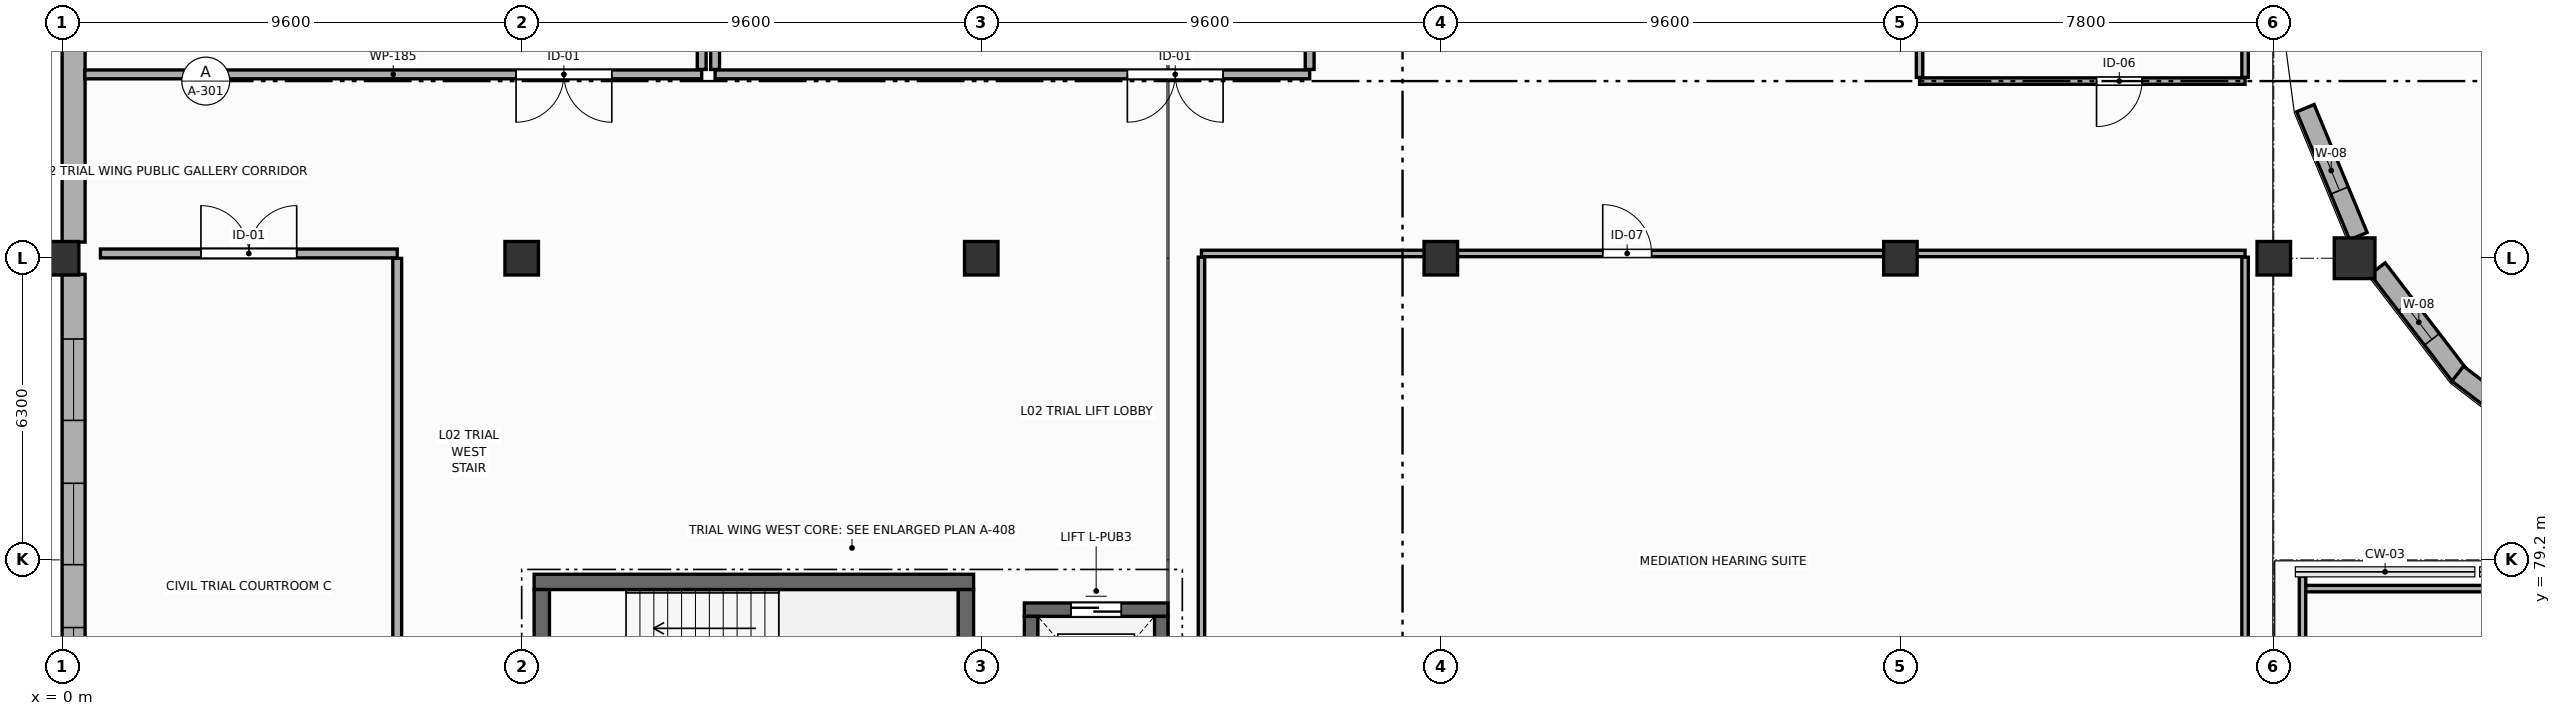
"""IFC4 building model, lengths in metres.
Left out: names, types, materials, properties, quantities, classifications, styles, units other than length and angle.
Written with IfcOpenShell. Run it as: python <this file> out.ifc"""

import sys

from ifc_helpers import new_model, si_unit, direction, frame, frame_2d, origin, origin_2d, place, context, subcontext, project, spatial, rectangle, circle, extrude, element, fill, save


model = new_model("IFC4")
c1 = context("Model", 3, precision=1e-05, world=origin(), true_north=direction((0.0, 1.0)))
c2 = subcontext(c1, "Body", "Model", "MODEL_VIEW")
j1 = project(units=[si_unit("LENGTHUNIT", "METRE"), si_unit("PLANEANGLEUNIT", "RADIAN")], contexts=[c1])
p1 = place(None, origin())
s1 = spatial("IfcSite", under=j1, at=p1, CompositionType="ELEMENT")
p2 = place(p1, origin())
s2 = spatial("IfcBuilding", under=s1, at=p2, CompositionType="ELEMENT")
p3 = place(p2, frame((0.0, 0.0, 5.4)))
s3 = spatial("IfcBuildingStorey", under=s2, at=p3, CompositionType="ELEMENT", Elevation=5.4)
p4 = place(p3, frame((47.888, 85.5, 0.0), z_axis=(0.0, 0.0, 1.0), x_axis=(1.0, 0.0, 0.0)))
e1 = element("IfcColumn", 1, at=p4, inside=s3, PredefinedType="COLUMN", context=c2, shape_type="SweptSolid", body=[
    extrude(circle(Radius=0.425, at=origin_2d()), origin(), (0.0, 0.0, 1.0), 4.5),
])
for number, where, z_axis, x_axis in (
    (2, (0.0, 85.5, 0.0), (0.0, 0.0, 1.0), (1.0, 0.0, 0.0)),
    (3, (9.6, 85.5, 0.0), (0.0, 0.0, 1.0), (1.0, 0.0, 0.0)),
    (4, (19.2, 85.5, 0.0), (0.0, 0.0, 1.0), (1.0, 0.0, 0.0)),
    (5, (28.8, 85.5, 0.0), (0.0, 0.0, 1.0), (1.0, 0.0, 0.0)),
    (6, (38.4, 85.5, 0.0), (0.0, 0.0, 1.0), (1.0, 0.0, 0.0)),
    (7, (46.2, 85.5, 0.0), (0.0, 0.0, 1.0), (1.0, 0.0, 0.0)),
):
    element("IfcColumn", number, at=place(p3, frame(where, z_axis=z_axis, x_axis=x_axis)), inside=s3, PredefinedType="COLUMN", context=c2, shape_type="SweptSolid", body=[
        extrude(rectangle(XDim=0.7, YDim=0.7, at=origin_2d()), origin(), (0.0, 0.0, 1.0), 4.5),
    ])
p5 = place(p3, frame((46.86, 88.635, 0.0), z_axis=(0.0, 0.0, 1.0), x_axis=(0.382642547526, -0.923896466506, 0.0)))
e8 = element("IfcWall", 8, at=p5, inside=s3, PredefinedType="ELEMENTEDWALL", context=c2, shape_type="SweptSolid", body=[
    extrude(rectangle(XDim=2.892, YDim=0.395, at=frame_2d((1.446, 0.0))), origin(), (0.0, 0.0, 1.0), 3.37),
])
p6 = place(p5, frame((0.962, 0.0, 0.85)))
e9 = element("IfcOpeningElement", 9, at=p6, cuts=e8, PredefinedType="OPENING", context=c2, shape_type="SweptSolid", body=[
    extrude(rectangle(XDim=0.9, YDim=1.85, at=frame_2d((0.45, 0.925))), frame((0.0, 0.208, 0.0), z_axis=(0.0, -1.0, 0.0), x_axis=(1.0, 0.0, 0.0)), (0.0, 0.0, 1.0), 0.415),
])
p7 = place(p3, frame((48.369, 85.283, 0.0), z_axis=(0.0, 0.0, 1.0), x_axis=(0.608787157184, -0.793333597705, 0.0)))
e10 = element("IfcWall", 10, at=p7, inside=s3, PredefinedType="ELEMENTEDWALL", context=c2, shape_type="SweptSolid", body=[
    extrude(rectangle(XDim=2.824, YDim=0.395, at=frame_2d((1.412, 0.0))), origin(), (0.0, 0.0, 1.0), 3.37),
])
p8 = place(p7, frame((0.962, 0.0, 0.85)))
e11 = element("IfcOpeningElement", 11, at=p8, cuts=e10, PredefinedType="OPENING", context=c2, shape_type="SweptSolid", body=[
    extrude(rectangle(XDim=0.9, YDim=1.85, at=frame_2d((0.45, 0.925))), frame((0.0, 0.208, 0.0), z_axis=(0.0, -1.0, 0.0), x_axis=(1.0, 0.0, 0.0)), (0.0, 0.0, 1.0), 0.415),
])
p9 = place(p3, frame((50.043, 83.089, 0.0), z_axis=(0.0, 0.0, 1.0), x_axis=(0.793301558375, -0.608828906574, 0.0)))
e12 = element("IfcWall", 12, at=p9, inside=s3, PredefinedType="ELEMENTEDWALL", context=c2, shape_type="SweptSolid", body=[
    extrude(rectangle(XDim=2.824, YDim=0.395, at=frame_2d((1.412, 0.0))), origin(), (0.0, 0.0, 1.0), 3.27),
])
p10 = place(p9, frame((0.962, 0.0, 0.85)))
e13 = element("IfcOpeningElement", 13, at=p10, cuts=e12, PredefinedType="OPENING", context=c2, shape_type="SweptSolid", body=[
    extrude(rectangle(XDim=0.9, YDim=1.85, at=frame_2d((0.45, 0.925))), frame((0.0, 0.208, 0.0), z_axis=(0.0, -1.0, 0.0), x_axis=(1.0, 0.0, 0.0)), (0.0, 0.0, 1.0), 0.415),
])
p11 = place(p3, frame((0.24, 74.742, 0.0), z_axis=(0.0, 0.0, 1.0), x_axis=(0.0, 1.0, 0.0)))
e14 = element("IfcWall", 14, at=p11, inside=s3, PredefinedType="STANDARD", context=c2, shape_type="SweptSolid", body=[
    extrude(rectangle(XDim=10.421, YDim=0.48, at=frame_2d((5.21, 0.0))), origin(), (0.0, 0.0, 1.0), 3.33),
])
p12 = place(p11, frame((1.345, 0.0, 0.85)))
e15 = element("IfcOpeningElement", 15, at=p12, cuts=e14, PredefinedType="OPENING", context=c2, shape_type="SweptSolid", body=[
    extrude(rectangle(XDim=1.7, YDim=2.3, at=frame_2d((0.85, 1.15))), frame((0.0, 0.25, 0.0), z_axis=(0.0, -1.0, 0.0), x_axis=(1.0, 0.0, 0.0)), (0.0, 0.0, 1.0), 0.5),
])
p13 = place(p11, frame((4.358, 0.0, 0.85)))
e16 = element("IfcOpeningElement", 16, at=p13, cuts=e14, PredefinedType="OPENING", context=c2, shape_type="SweptSolid", body=[
    extrude(rectangle(XDim=1.7, YDim=2.3, at=frame_2d((0.85, 1.15))), frame((0.0, 0.25, 0.0), z_axis=(0.0, -1.0, 0.0), x_axis=(1.0, 0.0, 0.0)), (0.0, 0.0, 1.0), 0.5),
])
p14 = place(p11, frame((7.371, 0.0, 0.85)))
e17 = element("IfcOpeningElement", 17, at=p14, cuts=e14, PredefinedType="OPENING", context=c2, shape_type="SweptSolid", body=[
    extrude(rectangle(XDim=1.7, YDim=2.3, at=frame_2d((0.85, 1.15))), frame((0.0, 0.25, 0.0), z_axis=(0.0, -1.0, 0.0), x_axis=(1.0, 0.0, 0.0)), (0.0, 0.0, 1.0), 0.5),
])
p15 = place(p3, frame((0.24, 85.837, 0.0), z_axis=(0.0, 0.0, 1.0), x_axis=(0.0, 1.0, 0.0)))
e18 = element("IfcWall", 18, at=p15, inside=s3, PredefinedType="STANDARD", context=c2, shape_type="SweptSolid", body=[
    extrude(rectangle(XDim=11.921, YDim=0.48, at=frame_2d((5.96, 0.0))), origin(), (0.0, 0.0, 1.0), 3.28),
])
p16 = place(p15, frame((5.113, 0.0, 0.76)))
e19 = element("IfcOpeningElement", 19, at=p16, cuts=e18, PredefinedType="OPENING", context=c2, shape_type="SweptSolid", body=[
    extrude(rectangle(XDim=1.7, YDim=2.3, at=frame_2d((0.85, 1.15))), frame((0.0, 0.25, 0.0), z_axis=(0.0, -1.0, 0.0), x_axis=(1.0, 0.0, 0.0)), (0.0, 0.0, 1.0), 0.5),
])
p17 = place(p15, frame((8.626, 0.0, 0.76)))
e20 = element("IfcOpeningElement", 20, at=p17, cuts=e18, PredefinedType="OPENING", context=c2, shape_type="SweptSolid", body=[
    extrude(rectangle(XDim=1.7, YDim=2.3, at=frame_2d((0.85, 1.15))), frame((0.0, 0.25, 0.0), z_axis=(0.0, -1.0, 0.0), x_axis=(1.0, 0.0, 0.0)), (0.0, 0.0, 1.0), 0.5),
])
p18 = place(p3, frame((9.86, 78.74, 0.0), z_axis=(0.0, 0.0, 1.0), x_axis=(1.0, 0.0, 0.0)))
e21 = element("IfcWall", 21, at=p18, inside=s3, PredefinedType="SHEAR", context=c2, shape_type="SweptSolid", body=[
    extrude(rectangle(XDim=9.18, YDim=0.32, at=frame_2d((4.59, 0.0))), origin(), (0.0, 0.0, 1.0), 4.24),
])
p19 = place(p3, frame((10.02, 75.18, 0.0), z_axis=(0.0, 0.0, 1.0), x_axis=(0.0, 1.0, 0.0)))
e22 = element("IfcWall", 22, at=p19, inside=s3, PredefinedType="SHEAR", context=c2, shape_type="SweptSolid", body=[
    extrude(rectangle(XDim=3.4, YDim=0.32, at=frame_2d((1.7, 0.0))), origin(), (0.0, 0.0, 1.0), 4.24),
])
p20 = place(p19, frame((1.125, 0.0, 0.0)))
e23 = element("IfcOpeningElement", 23, at=p20, cuts=e22, PredefinedType="OPENING", context=c2, shape_type="SweptSolid", body=[
    extrude(rectangle(XDim=1.15, YDim=2.2, at=frame_2d((0.575, 1.1))), frame((0.0, 0.17, 0.0), z_axis=(0.0, -1.0, 0.0), x_axis=(1.0, 0.0, 0.0)), (0.0, 0.0, 1.0), 0.34),
])
p21 = place(p3, frame((18.88, 78.58, 0.0), z_axis=(0.0, 0.0, 1.0), x_axis=(0.0, -1.0, 0.0)))
e24 = element("IfcWall", 24, at=p21, inside=s3, PredefinedType="SHEAR", context=c2, shape_type="SweptSolid", body=[
    extrude(rectangle(XDim=3.4, YDim=0.32, at=frame_2d((1.7, 0.0))), origin(), (0.0, 0.0, 1.0), 4.24),
])
p22 = place(p3, frame((20.1, 78.16, 0.0), z_axis=(0.0, 0.0, 1.0), x_axis=(1.0, 0.0, 0.0)))
e25 = element("IfcWall", 25, at=p22, inside=s3, PredefinedType="SHEAR", context=c2, shape_type="SweptSolid", body=[
    extrude(rectangle(XDim=3.0, YDim=0.28, at=frame_2d((1.5, 0.0))), origin(), (0.0, 0.0, 1.0), 4.24),
])
p23 = place(p22, frame((0.975, 0.0, 0.0)))
e26 = element("IfcOpeningElement", 26, at=p23, cuts=e25, PredefinedType="OPENING", context=c2, shape_type="SweptSolid", body=[
    extrude(rectangle(XDim=1.05, YDim=2.2, at=frame_2d((0.525, 1.1))), frame((0.0, 0.15, 0.0), z_axis=(0.0, -1.0, 0.0), x_axis=(1.0, 0.0, 0.0)), (0.0, 0.0, 1.0), 0.3),
])
for number, where, z_axis, x_axis in (
    (27, (20.24, 75.18, 0.0), (0.0, 0.0, 1.0), (0.0, 1.0, 0.0)),
    (28, (22.96, 78.02, 0.0), (0.0, 0.0, 1.0), (0.0, -1.0, 0.0)),
):
    element("IfcWall", number, at=place(p3, frame(where, z_axis=z_axis, x_axis=x_axis)), inside=s3, PredefinedType="SHEAR", context=c2, shape_type="SweptSolid", body=[
        extrude(rectangle(XDim=2.84, YDim=0.28, at=frame_2d((1.42, 0.0))), origin(), (0.0, 0.0, 1.0), 4.24),
    ])
p24 = place(p3, frame((13.36, 89.34, 0.0), z_axis=(0.0, 0.0, 1.0), x_axis=(-1.0, 0.0, 0.0)))
e29 = element("IfcWall", 29, at=p24, inside=s3, PredefinedType="PARTITIONING", context=c2, shape_type="SweptSolid", body=[
    extrude(rectangle(XDim=12.886, YDim=0.185, at=frame_2d((6.443, 0.0))), origin(), (0.0, 0.0, 1.0), 3.33),
])
p25 = place(p24, frame((1.878, 0.0, 0.0)))
e30 = element("IfcOpeningElement", 30, at=p25, cuts=e29, PredefinedType="OPENING", context=c2, shape_type="SweptSolid", body=[
    extrude(rectangle(XDim=2.0, YDim=2.5, at=frame_2d((1.0, 1.25))), frame((0.0, 0.103, 0.0), z_axis=(0.0, -1.0, 0.0), x_axis=(1.0, 0.0, 0.0)), (0.0, 0.0, 1.0), 0.205),
])
p26 = place(p3, frame((13.36, 112.326, 0.0), z_axis=(0.0, 0.0, 1.0), x_axis=(0.0, -1.0, 0.0)))
e31 = element("IfcWall", 31, at=p26, inside=s3, PredefinedType="PARTITIONING", context=c2, shape_type="SweptSolid", body=[
    extrude(rectangle(XDim=22.884, YDim=0.185, at=frame_2d((11.442, 0.0))), origin(), (0.0, 0.0, 1.0), 3.43),
])
p27 = place(p3, frame((26.06, 89.34, 0.0), z_axis=(0.0, 0.0, 1.0), x_axis=(-1.0, 0.0, 0.0)))
e32 = element("IfcWall", 32, at=p27, inside=s3, PredefinedType="PARTITIONING", context=c2, shape_type="SweptSolid", body=[
    extrude(rectangle(XDim=12.42, YDim=0.185, at=frame_2d((6.21, 0.0))), origin(), (0.0, 0.0, 1.0), 3.33),
])
p28 = place(p27, frame((1.808, 0.0, 0.0)))
e33 = element("IfcOpeningElement", 33, at=p28, cuts=e32, PredefinedType="OPENING", context=c2, shape_type="SweptSolid", body=[
    extrude(rectangle(XDim=2.0, YDim=2.5, at=frame_2d((1.0, 1.25))), frame((0.0, 0.103, 0.0), z_axis=(0.0, -1.0, 0.0), x_axis=(1.0, 0.0, 0.0)), (0.0, 0.0, 1.0), 0.205),
])
for number, where, z_axis, x_axis in (
    (34, (13.64, 89.442, 0.0), (0.0, 0.0, 1.0), (0.0, 1.0, 0.0)),
    (35, (26.06, 97.597, 0.0), (0.0, 0.0, 1.0), (0.0, -1.0, 0.0)),
):
    element("IfcWall", number, at=place(p3, frame(where, z_axis=z_axis, x_axis=x_axis)), inside=s3, PredefinedType="PARTITIONING", context=c2, shape_type="SweptSolid", body=[
        extrude(rectangle(XDim=8.155, YDim=0.185, at=frame_2d((4.078, 0.0))), origin(), (0.0, 0.0, 1.0), 3.58),
    ])
p29 = place(p3, frame((45.6, 89.2, 0.0), z_axis=(0.0, 0.0, 1.0), x_axis=(-1.0, 0.0, 0.0)))
e36 = element("IfcWall", 36, at=p29, inside=s3, PredefinedType="PARTITIONING", context=c2, shape_type="SweptSolid", body=[
    extrude(rectangle(XDim=6.8, YDim=0.135, at=frame_2d((3.4, 0.0))), origin(), (0.0, 0.0, 1.0), 3.33),
])
p30 = place(p29, frame((2.153, 0.0, 0.0)))
e37 = element("IfcOpeningElement", 37, at=p30, cuts=e36, PredefinedType="OPENING", context=c2, shape_type="SweptSolid", body=[
    extrude(rectangle(XDim=0.95, YDim=2.15, at=frame_2d((0.475, 1.075))), frame((0.0, 0.077, 0.0), z_axis=(0.0, -1.0, 0.0), x_axis=(1.0, 0.0, 0.0)), (0.0, 0.0, 1.0), 0.155),
])
p31 = place(p3, frame((38.8, 89.278, 0.0), z_axis=(0.0, 0.0, 1.0), x_axis=(0.0, 1.0, 0.0)))
e38 = element("IfcWall", 38, at=p31, inside=s3, PredefinedType="PARTITIONING", context=c2, shape_type="SweptSolid", body=[
    extrude(rectangle(XDim=12.645, YDim=0.135, at=frame_2d((6.323, 0.0))), origin(), (0.0, 0.0, 1.0), 3.28),
])
p32 = place(p3, frame((45.6, 101.923, 0.0), z_axis=(0.0, 0.0, 1.0), x_axis=(0.0, -1.0, 0.0)))
e39 = element("IfcWall", 39, at=p32, inside=s3, PredefinedType="PARTITIONING", context=c2, shape_type="SweptSolid", body=[
    extrude(rectangle(XDim=12.645, YDim=0.135, at=frame_2d((6.323, 0.0))), origin(), (0.0, 0.0, 1.0), 3.57),
])
p33 = place(p3, frame((0.8, 85.6, 0.0), z_axis=(0.0, 0.0, 1.0), x_axis=(1.0, 0.0, 0.0)))
e40 = element("IfcWall", 40, at=p33, inside=s3, PredefinedType="PARTITIONING", context=c2, shape_type="SweptSolid", body=[
    extrude(rectangle(XDim=6.2, YDim=0.185, at=frame_2d((3.1, 0.0))), origin(), (0.0, 0.0, 1.0), 3.43),
])
p34 = place(p33, frame((2.1, 0.0, 0.0)))
e41 = element("IfcOpeningElement", 41, at=p34, cuts=e40, PredefinedType="OPENING", context=c2, shape_type="SweptSolid", body=[
    extrude(rectangle(XDim=2.0, YDim=2.5, at=frame_2d((1.0, 1.25))), frame((0.0, 0.103, 0.0), z_axis=(0.0, -1.0, 0.0), x_axis=(1.0, 0.0, 0.0)), (0.0, 0.0, 1.0), 0.205),
])
p35 = place(p3, frame((7.0, 85.498, 0.0), z_axis=(0.0, 0.0, 1.0), x_axis=(0.0, -1.0, 0.0)))
e42 = element("IfcWall", 42, at=p35, inside=s3, PredefinedType="PARTITIONING", context=c2, shape_type="SweptSolid", body=[
    extrude(rectangle(XDim=17.595, YDim=0.185, at=frame_2d((8.797, 0.0))), origin(), (0.0, 0.0, 1.0), 3.43),
])
p36 = place(p3, frame((23.8, 85.6, 0.0), z_axis=(0.0, 0.0, 1.0), x_axis=(1.0, 0.0, 0.0)))
e43 = element("IfcWall", 43, at=p36, inside=s3, PredefinedType="PARTITIONING", context=c2, shape_type="SweptSolid", body=[
    extrude(rectangle(XDim=21.8, YDim=0.135, at=frame_2d((10.9, 0.0))), origin(), (0.0, 0.0, 1.0), 3.33),
])
p37 = place(p36, frame((8.382, 0.0, 0.0)))
e44 = element("IfcOpeningElement", 44, at=p37, cuts=e43, PredefinedType="OPENING", context=c2, shape_type="SweptSolid", body=[
    extrude(rectangle(XDim=1.02, YDim=2.15, at=frame_2d((0.51, 1.075))), frame((0.0, 0.077, 0.0), z_axis=(0.0, -1.0, 0.0), x_axis=(1.0, 0.0, 0.0)), (0.0, 0.0, 1.0), 0.155),
])
p38 = place(p3, frame((23.8, 67.877, 0.0), z_axis=(0.0, 0.0, 1.0), x_axis=(0.0, 1.0, 0.0)))
e45 = element("IfcWall", 45, at=p38, inside=s3, PredefinedType="PARTITIONING", context=c2, shape_type="SweptSolid", body=[
    extrude(rectangle(XDim=17.645, YDim=0.135, at=frame_2d((8.823, 0.0))), origin(), (0.0, 0.0, 1.0), 3.43),
])
p39 = place(p3, frame((45.6, 85.522, 0.0), z_axis=(0.0, 0.0, 1.0), x_axis=(0.0, -1.0, 0.0)))
e46 = element("IfcWall", 46, at=p39, inside=s3, PredefinedType="PARTITIONING", context=c2, shape_type="SweptSolid", body=[
    extrude(rectangle(XDim=18.103, YDim=0.135, at=frame_2d((9.051, 0.0))), origin(), (0.0, 0.0, 1.0), 3.57),
])
p40 = place(p3, frame((46.8, 78.6, 0.0), z_axis=(0.0, 0.0, 1.0), x_axis=(1.0, 0.0, 0.0)))
e47 = element("IfcWall", 47, at=p40, inside=s3, PredefinedType="PARTITIONING", context=c2, shape_type="SweptSolid", body=[
    extrude(rectangle(XDim=9.6, YDim=0.135, at=frame_2d((4.8, 0.0))), origin(), (0.0, 0.0, 1.0), 4.225),
])
p41 = place(p3, frame((46.8, 70.877, 0.0), z_axis=(0.0, 0.0, 1.0), x_axis=(0.0, 1.0, 0.0)))
e48 = element("IfcWall", 48, at=p41, inside=s3, PredefinedType="PARTITIONING", context=c2, shape_type="SweptSolid", body=[
    extrude(rectangle(XDim=7.983, YDim=0.135, at=frame_2d((3.991, 0.0))), origin(), (0.0, 0.0, 1.0), 3.33),
])
p42 = place(p6, origin())
e49 = element("IfcWindow", 49, at=p42, inside=s3, PartitioningType="SINGLE_PANEL", PredefinedType="WINDOW", context=c2, shape_type="SweptSolid", body=[
    extrude(rectangle(XDim=0.9, YDim=1.85, at=frame_2d((0.45, 0.925))), frame((0.0, 0.03, 0.0), z_axis=(0.0, -1.0, 0.0), x_axis=(1.0, 0.0, 0.0)), (0.0, 0.0, 1.0), 0.06),
])
fill(e9, e49)
p43 = place(p8, origin())
e50 = element("IfcWindow", 50, at=p43, inside=s3, PartitioningType="SINGLE_PANEL", PredefinedType="WINDOW", context=c2, shape_type="SweptSolid", body=[
    extrude(rectangle(XDim=0.9, YDim=1.85, at=frame_2d((0.45, 0.925))), frame((0.0, 0.03, 0.0), z_axis=(0.0, -1.0, 0.0), x_axis=(1.0, 0.0, 0.0)), (0.0, 0.0, 1.0), 0.06),
])
fill(e11, e50)
p44 = place(p12, origin())
e51 = element("IfcWindow", 51, at=p44, inside=s3, PartitioningType="SINGLE_PANEL", PredefinedType="WINDOW", context=c2, shape_type="SweptSolid", body=[
    extrude(rectangle(XDim=1.7, YDim=2.3, at=frame_2d((0.85, 1.15))), frame((0.0, 0.03, 0.0), z_axis=(0.0, -1.0, 0.0), x_axis=(1.0, 0.0, 0.0)), (0.0, 0.0, 1.0), 0.06),
])
fill(e15, e51)
p45 = place(p13, origin())
e52 = element("IfcWindow", 52, at=p45, inside=s3, PartitioningType="SINGLE_PANEL", PredefinedType="WINDOW", context=c2, shape_type="SweptSolid", body=[
    extrude(rectangle(XDim=1.7, YDim=2.3, at=frame_2d((0.85, 1.15))), frame((0.0, 0.03, 0.0), z_axis=(0.0, -1.0, 0.0), x_axis=(1.0, 0.0, 0.0)), (0.0, 0.0, 1.0), 0.06),
])
fill(e16, e52)
p46 = place(p14, origin())
e53 = element("IfcWindow", 53, at=p46, inside=s3, PartitioningType="SINGLE_PANEL", PredefinedType="WINDOW", context=c2, shape_type="SweptSolid", body=[
    extrude(rectangle(XDim=1.7, YDim=2.3, at=frame_2d((0.85, 1.15))), frame((0.0, 0.03, 0.0), z_axis=(0.0, -1.0, 0.0), x_axis=(1.0, 0.0, 0.0)), (0.0, 0.0, 1.0), 0.06),
])
fill(e17, e53)
p47 = place(p23, origin())
e54 = element("IfcDoor", 54, at=p47, inside=s3, OperationType="DOUBLE_DOOR_SLIDING", PredefinedType="DOOR", context=c2, shape_type="SweptSolid", body=[
    extrude(rectangle(XDim=1.05, YDim=2.2, at=frame_2d((0.525, 1.1))), frame((0.0, 0.025, 0.0), z_axis=(0.0, -1.0, 0.0), x_axis=(1.0, 0.0, 0.0)), (0.0, 0.0, 1.0), 0.05),
])
fill(e26, e54)
p48 = place(p25, origin())
e55 = element("IfcDoor", 55, at=p48, inside=s3, OperationType="DOUBLE_DOOR_SINGLE_SWING", PredefinedType="DOOR", context=c2, shape_type="SweptSolid", body=[
    extrude(rectangle(XDim=2.0, YDim=2.5, at=frame_2d((1.0, 1.25))), frame((0.0, 0.025, 0.0), z_axis=(0.0, -1.0, 0.0), x_axis=(1.0, 0.0, 0.0)), (0.0, 0.0, 1.0), 0.05),
])
fill(e30, e55)
p49 = place(p28, origin())
e56 = element("IfcDoor", 56, at=p49, inside=s3, OperationType="DOUBLE_DOOR_SINGLE_SWING", PredefinedType="DOOR", context=c2, shape_type="SweptSolid", body=[
    extrude(rectangle(XDim=2.0, YDim=2.5, at=frame_2d((1.0, 1.25))), frame((0.0, 0.025, 0.0), z_axis=(0.0, -1.0, 0.0), x_axis=(1.0, 0.0, 0.0)), (0.0, 0.0, 1.0), 0.05),
])
fill(e33, e56)
p50 = place(p30, origin())
e57 = element("IfcDoor", 57, at=p50, inside=s3, OperationType="SINGLE_SWING_RIGHT", PredefinedType="DOOR", context=c2, shape_type="SweptSolid", body=[
    extrude(rectangle(XDim=0.95, YDim=2.15, at=frame_2d((0.475, 1.075))), frame((0.0, 0.025, 0.0), z_axis=(0.0, -1.0, 0.0), x_axis=(1.0, 0.0, 0.0)), (0.0, 0.0, 1.0), 0.05),
])
fill(e37, e57)
p51 = place(p34, origin())
e58 = element("IfcDoor", 58, at=p51, inside=s3, OperationType="DOUBLE_DOOR_SINGLE_SWING", PredefinedType="DOOR", context=c2, shape_type="SweptSolid", body=[
    extrude(rectangle(XDim=2.0, YDim=2.5, at=frame_2d((1.0, 1.25))), frame((0.0, 0.025, 0.0), z_axis=(0.0, -1.0, 0.0), x_axis=(1.0, 0.0, 0.0)), (0.0, 0.0, 1.0), 0.05),
])
fill(e41, e58)
p52 = place(p37, origin())
e59 = element("IfcDoor", 59, at=p52, inside=s3, OperationType="SINGLE_SWING_LEFT", PredefinedType="DOOR", context=c2, shape_type="SweptSolid", body=[
    extrude(rectangle(XDim=1.02, YDim=2.15, at=frame_2d((0.51, 1.075))), frame((0.0, 0.025, 0.0), z_axis=(0.0, -1.0, 0.0), x_axis=(1.0, 0.0, 0.0)), (0.0, 0.0, 1.0), 0.05),
])
fill(e44, e59)
save(model, sys.argv[1])
